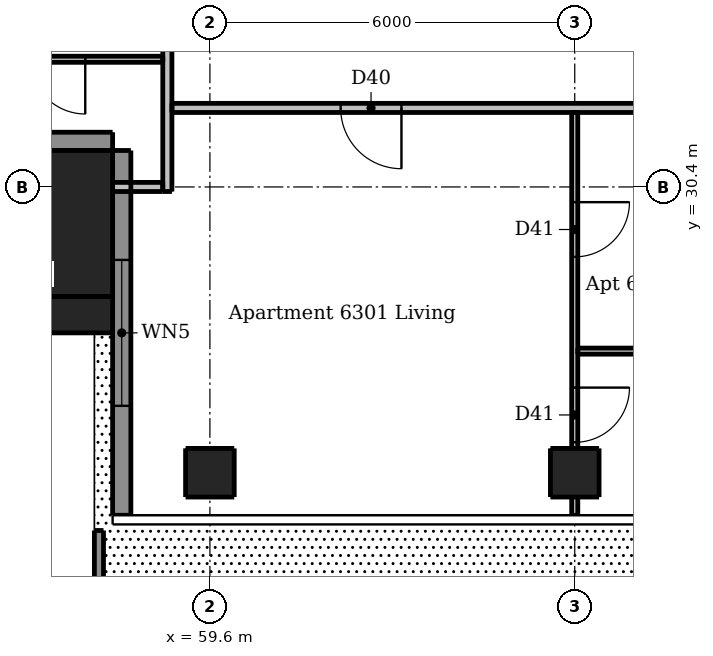
"""IFC4 building model, lengths in metres.
Left out: names, types, materials, properties, quantities, classifications, styles, units other than length and angle.
Written with IfcOpenShell. Run it as: python <this file> out.ifc"""

import sys

from ifc_helpers import new_model, si_unit, direction, frame, frame_2d, origin, origin_2d, place, context, subcontext, project, spatial, rectangle, extrude, element, fill, save


model = new_model("IFC4")
c1 = context("Model", 3, precision=1e-05, world=origin(), true_north=direction((0.0, 1.0)))
c2 = subcontext(c1, "Body", "Model", "MODEL_VIEW")
j1 = project(units=[si_unit("LENGTHUNIT", "METRE"), si_unit("PLANEANGLEUNIT", "RADIAN")], contexts=[c1])
p1 = place(None, origin())
s1 = spatial("IfcSite", under=j1, at=p1, CompositionType="ELEMENT")
p2 = place(p1, origin())
s2 = spatial("IfcBuilding", under=s1, at=p2, CompositionType="ELEMENT")
p3 = place(p2, frame((0.0, 0.0, 238.9)))
s3 = spatial("IfcBuildingStorey", under=s2, at=p3, CompositionType="ELEMENT", Elevation=238.9)
for number, where, z_axis, x_axis in (
    (1, (59.6, 25.7, 0.0), (0.0, 0.0, 1.0), (1.0, 0.0, 0.0)),
    (2, (65.6, 25.7, 0.0), (0.0, 0.0, 1.0), (1.0, 0.0, 0.0)),
):
    element("IfcColumn", number, at=place(p3, frame(where, z_axis=z_axis, x_axis=x_axis)), inside=s3, PredefinedType="COLUMN", context=c2, shape_type="SweptSolid", body=[
        extrude(rectangle(XDim=0.8, YDim=0.8, at=origin_2d()), origin(), (0.0, 0.0, 1.0), 3.05),
    ])
p4 = place(p3, frame((56.5, 28.3, 0.0), z_axis=(0.0, 0.0, 1.0), x_axis=(1.0, 0.0, 0.0)))
e3 = element("IfcColumn", 3, at=p4, inside=s3, PredefinedType="COLUMN", context=c2, shape_type="SweptSolid", body=[
    extrude(rectangle(XDim=3.0, YDim=0.6, at=origin_2d()), origin(), (0.0, 0.0, 1.0), 2.4),
])
p5 = place(p3, frame((56.8, 29.8, 0.0), z_axis=(0.0, 0.0, 1.0), x_axis=(1.0, 0.0, 0.0)))
e4 = element("IfcColumn", 4, at=p5, inside=s3, PredefinedType="COLUMN", context=c2, shape_type="SweptSolid", body=[
    extrude(rectangle(XDim=2.4, YDim=2.4, at=origin_2d()), origin(), (0.0, 0.0, 1.0), 3.3),
])
p6 = place(p3, frame((53.0, 31.15, 0.0), z_axis=(0.0, 0.0, 1.0), x_axis=(1.0, 0.0, 0.0)))
e5 = element("IfcWall", 5, at=p6, inside=s3, PredefinedType="SOLIDWALL", context=c2, shape_type="SweptSolid", body=[
    extrude(rectangle(XDim=5.0, YDim=0.3, at=frame_2d((2.5, 0.0))), origin(), (0.0, 0.0, 1.0), 3.05),
])
p7 = place(p3, frame((58.15, 31.0, 0.0), z_axis=(0.0, 0.0, 1.0), x_axis=(0.0, -1.0, 0.0)))
e6 = element("IfcWall", 6, at=p7, inside=s3, PredefinedType="SOLIDWALL", context=c2, shape_type="SweptSolid", body=[
    extrude(rectangle(XDim=6.0, YDim=0.3, at=frame_2d((3.0, 0.0))), origin(), (0.0, 0.0, 1.0), 3.05),
])
p8 = place(p7, frame((1.8, 0.0, 0.15)))
e7 = element("IfcOpeningElement", 7, at=p8, cuts=e6, PredefinedType="OPENING", context=c2, shape_type="SweptSolid", body=[
    extrude(rectangle(XDim=2.4, YDim=2.1, at=frame_2d((1.2, 1.05))), frame((0.0, 0.16, 0.0), z_axis=(0.0, -1.0, 0.0), x_axis=(1.0, 0.0, 0.0)), (0.0, 0.0, 1.0), 0.32),
])
p9 = place(p3, frame((57.775, 24.75, 0.0), z_axis=(0.0, 0.0, 1.0), x_axis=(0.0, -1.0, 0.0)))
e8 = element("IfcWall", 8, at=p9, inside=s3, PredefinedType="PARAPET", context=c2, shape_type="SweptSolid", body=[
    extrude(rectangle(XDim=2.25, YDim=0.15, at=frame_2d((1.125, 0.0))), origin(), (0.0, 0.0, 1.0), 1.1),
])
p10 = place(p3, frame((65.6, 31.625, 0.0), z_axis=(0.0, 0.0, 1.0), x_axis=(0.0, -1.0, 0.0)))
e9 = element("IfcWall", 9, at=p10, inside=s3, PredefinedType="PARTITIONING", context=c2, shape_type="SweptSolid", body=[
    extrude(rectangle(XDim=6.625, YDim=0.1, at=frame_2d((3.312, 0.0))), origin(), (0.0, 0.0, 1.0), 2.59),
])
p11 = place(p10, frame((1.475, 0.0, 0.0)))
e10 = element("IfcOpeningElement", 10, at=p11, cuts=e9, PredefinedType="OPENING", context=c2, shape_type="SweptSolid", body=[
    extrude(rectangle(XDim=0.9, YDim=2.1, at=frame_2d((0.45, 1.05))), frame((0.0, 0.06, 0.0), z_axis=(0.0, -1.0, 0.0), x_axis=(1.0, 0.0, 0.0)), (0.0, 0.0, 1.0), 0.12),
])
p12 = place(p10, frame((4.525, 0.0, 0.0)))
e11 = element("IfcOpeningElement", 11, at=p12, cuts=e9, PredefinedType="OPENING", context=c2, shape_type="SweptSolid", body=[
    extrude(rectangle(XDim=0.9, YDim=2.1, at=frame_2d((0.45, 1.05))), frame((0.0, 0.06, 0.0), z_axis=(0.0, -1.0, 0.0), x_axis=(1.0, 0.0, 0.0)), (0.0, 0.0, 1.0), 0.12),
])
p13 = place(p3, frame((58.825, 32.5, 0.0), z_axis=(0.0, 0.0, 1.0), x_axis=(-1.0, 0.0, 0.0)))
e12 = element("IfcWall", 12, at=p13, inside=s3, PredefinedType="PARTITIONING", context=c2, shape_type="SweptSolid", body=[
    extrude(rectangle(XDim=3.475, YDim=0.1, at=frame_2d((1.737, 0.0))), origin(), (0.0, 0.0, 1.0), 3.05),
])
p14 = place(p13, frame((1.275, 0.0, 0.0)))
e13 = element("IfcOpeningElement", 13, at=p14, cuts=e12, PredefinedType="OPENING", context=c2, shape_type="SweptSolid", body=[
    extrude(rectangle(XDim=0.9, YDim=2.1, at=frame_2d((0.45, 1.05))), frame((0.0, 0.06, 0.0), z_axis=(0.0, -1.0, 0.0), x_axis=(1.0, 0.0, 0.0)), (0.0, 0.0, 1.0), 0.12),
])
p15 = place(p3, frame((65.65, 27.7, 0.0), z_axis=(0.0, 0.0, 1.0), x_axis=(1.0, 0.0, 0.0)))
e14 = element("IfcWall", 14, at=p15, inside=s3, PredefinedType="PARTITIONING", context=c2, shape_type="SweptSolid", body=[
    extrude(rectangle(XDim=5.875, YDim=0.1, at=frame_2d((2.938, 0.0))), origin(), (0.0, 0.0, 1.0), 3.05),
])
p16 = place(p15, frame((3.75, 0.0, 0.0)))
e15 = element("IfcOpeningElement", 15, at=p16, cuts=e14, PredefinedType="OPENING", context=c2, shape_type="SweptSolid", body=[
    extrude(rectangle(XDim=0.8, YDim=2.1, at=frame_2d((0.4, 1.05))), frame((0.0, 0.06, 0.0), z_axis=(0.0, -1.0, 0.0), x_axis=(1.0, 0.0, 0.0)), (0.0, 0.0, 1.0), 0.12),
])
p17 = place(p3, frame((58.9, 30.325, 0.0), z_axis=(0.0, 0.0, 1.0), x_axis=(0.0, 1.0, 0.0)))
e16 = element("IfcWall", 16, at=p17, inside=s3, PredefinedType="PARTITIONING", context=c2, shape_type="SweptSolid", body=[
    extrude(rectangle(XDim=30.85, YDim=0.15, at=frame_2d((15.425, 0.0))), origin(), (0.0, 0.0, 1.0), 3.05),
])
p18 = place(p17, frame((2.575, 0.0, 0.0)))
e17 = element("IfcOpeningElement", 17, at=p18, cuts=e16, PredefinedType="OPENING", context=c2, shape_type="SweptSolid", body=[
    extrude(rectangle(XDim=1.0, YDim=2.1, at=frame_2d((0.5, 1.05))), frame((0.0, 0.085, 0.0), z_axis=(0.0, -1.0, 0.0), x_axis=(1.0, 0.0, 0.0)), (0.0, 0.0, 1.0), 0.17),
])
p19 = place(p17, frame((8.575, 0.0, 0.0)))
e18 = element("IfcOpeningElement", 18, at=p19, cuts=e16, PredefinedType="OPENING", context=c2, shape_type="SweptSolid", body=[
    extrude(rectangle(XDim=1.0, YDim=2.1, at=frame_2d((0.5, 1.05))), frame((0.0, 0.085, 0.0), z_axis=(0.0, -1.0, 0.0), x_axis=(1.0, 0.0, 0.0)), (0.0, 0.0, 1.0), 0.17),
])
p20 = place(p17, frame((14.575, 0.0, 0.0)))
e19 = element("IfcOpeningElement", 19, at=p20, cuts=e16, PredefinedType="OPENING", context=c2, shape_type="SweptSolid", body=[
    extrude(rectangle(XDim=1.0, YDim=2.1, at=frame_2d((0.5, 1.05))), frame((0.0, 0.085, 0.0), z_axis=(0.0, -1.0, 0.0), x_axis=(1.0, 0.0, 0.0)), (0.0, 0.0, 1.0), 0.17),
])
p21 = place(p17, frame((26.925, 0.0, 0.0)))
e20 = element("IfcOpeningElement", 20, at=p21, cuts=e16, PredefinedType="OPENING", context=c2, shape_type="SweptSolid", body=[
    extrude(rectangle(XDim=1.0, YDim=2.1, at=frame_2d((0.5, 1.05))), frame((0.0, 0.085, 0.0), z_axis=(0.0, -1.0, 0.0), x_axis=(1.0, 0.0, 0.0)), (0.0, 0.0, 1.0), 0.17),
])
p22 = place(p3, frame((89.525, 31.7, 0.0), z_axis=(0.0, 0.0, 1.0), x_axis=(-1.0, 0.0, 0.0)))
e21 = element("IfcWall", 21, at=p22, inside=s3, PredefinedType="PARTITIONING", context=c2, shape_type="SweptSolid", body=[
    extrude(rectangle(XDim=30.55, YDim=0.15, at=frame_2d((15.275, 0.0))), origin(), (0.0, 0.0, 1.0), 3.05),
])
p23 = place(p22, frame((26.775, 0.0, 0.0)))
e22 = element("IfcOpeningElement", 22, at=p23, cuts=e21, PredefinedType="OPENING", context=c2, shape_type="SweptSolid", body=[
    extrude(rectangle(XDim=1.0, YDim=2.1, at=frame_2d((0.5, 1.05))), frame((0.0, 0.085, 0.0), z_axis=(0.0, -1.0, 0.0), x_axis=(1.0, 0.0, 0.0)), (0.0, 0.0, 1.0), 0.17),
])
p24 = place(p22, frame((14.425, 0.0, 0.0)))
e23 = element("IfcOpeningElement", 23, at=p24, cuts=e21, PredefinedType="OPENING", context=c2, shape_type="SweptSolid", body=[
    extrude(rectangle(XDim=1.0, YDim=2.1, at=frame_2d((0.5, 1.05))), frame((0.0, 0.085, 0.0), z_axis=(0.0, -1.0, 0.0), x_axis=(1.0, 0.0, 0.0)), (0.0, 0.0, 1.0), 0.17),
])
p25 = place(p22, frame((6.962, 0.0, 0.0)))
e24 = element("IfcOpeningElement", 24, at=p25, cuts=e21, PredefinedType="OPENING", context=c2, shape_type="SweptSolid", body=[
    extrude(rectangle(XDim=1.0, YDim=2.1, at=frame_2d((0.5, 1.05))), frame((0.0, 0.085, 0.0), z_axis=(0.0, -1.0, 0.0), x_axis=(1.0, 0.0, 0.0)), (0.0, 0.0, 1.0), 0.17),
])
p26 = place(p3, frame((58.0, 30.4, 0.0), z_axis=(0.0, 0.0, 1.0), x_axis=(1.0, 0.0, 0.0)))
e25 = element("IfcWall", 25, at=p26, inside=s3, PredefinedType="PARTITIONING", context=c2, shape_type="SweptSolid", body=[
    extrude(rectangle(XDim=0.825, YDim=0.15, at=frame_2d((0.413, 0.0))), origin(), (0.0, 0.0, 1.0), 3.05),
])
p27 = place(p8, origin())
e26 = element("IfcWindow", 26, at=p27, inside=s3, PartitioningType="DOUBLE_PANEL_VERTICAL", PredefinedType="WINDOW", context=c2, shape_type="SweptSolid", body=[
    extrude(rectangle(XDim=2.4, YDim=2.1, at=frame_2d((1.2, 1.05))), frame((0.0, 0.03, 0.0), z_axis=(0.0, -1.0, 0.0), x_axis=(1.0, 0.0, 0.0)), (0.0, 0.0, 1.0), 0.06),
])
fill(e7, e26)
p28 = place(p23, origin())
e27 = element("IfcDoor", 27, at=p28, inside=s3, OperationType="SINGLE_SWING_LEFT", PredefinedType="DOOR", context=c2, shape_type="SweptSolid", body=[
    extrude(rectangle(XDim=1.0, YDim=2.1, at=frame_2d((0.5, 1.05))), frame((0.0, 0.025, 0.0), z_axis=(0.0, -1.0, 0.0), x_axis=(1.0, 0.0, 0.0)), (0.0, 0.0, 1.0), 0.05),
])
fill(e22, e27)
p29 = place(p11, origin())
e28 = element("IfcDoor", 28, at=p29, inside=s3, OperationType="SINGLE_SWING_LEFT", PredefinedType="DOOR", context=c2, shape_type="SweptSolid", body=[
    extrude(rectangle(XDim=0.9, YDim=2.1, at=frame_2d((0.45, 1.05))), frame((0.0, 0.025, 0.0), z_axis=(0.0, -1.0, 0.0), x_axis=(1.0, 0.0, 0.0)), (0.0, 0.0, 1.0), 0.05),
])
fill(e10, e28)
p30 = place(p12, origin())
e29 = element("IfcDoor", 29, at=p30, inside=s3, OperationType="SINGLE_SWING_LEFT", PredefinedType="DOOR", context=c2, shape_type="SweptSolid", body=[
    extrude(rectangle(XDim=0.9, YDim=2.1, at=frame_2d((0.45, 1.05))), frame((0.0, 0.025, 0.0), z_axis=(0.0, -1.0, 0.0), x_axis=(1.0, 0.0, 0.0)), (0.0, 0.0, 1.0), 0.05),
])
fill(e11, e29)
p31 = place(p14, origin())
e30 = element("IfcDoor", 30, at=p31, inside=s3, OperationType="SINGLE_SWING_LEFT", PredefinedType="DOOR", context=c2, shape_type="SweptSolid", body=[
    extrude(rectangle(XDim=0.9, YDim=2.1, at=frame_2d((0.45, 1.05))), frame((0.0, 0.025, 0.0), z_axis=(0.0, -1.0, 0.0), x_axis=(1.0, 0.0, 0.0)), (0.0, 0.0, 1.0), 0.05),
])
fill(e13, e30)
save(model, sys.argv[1])
